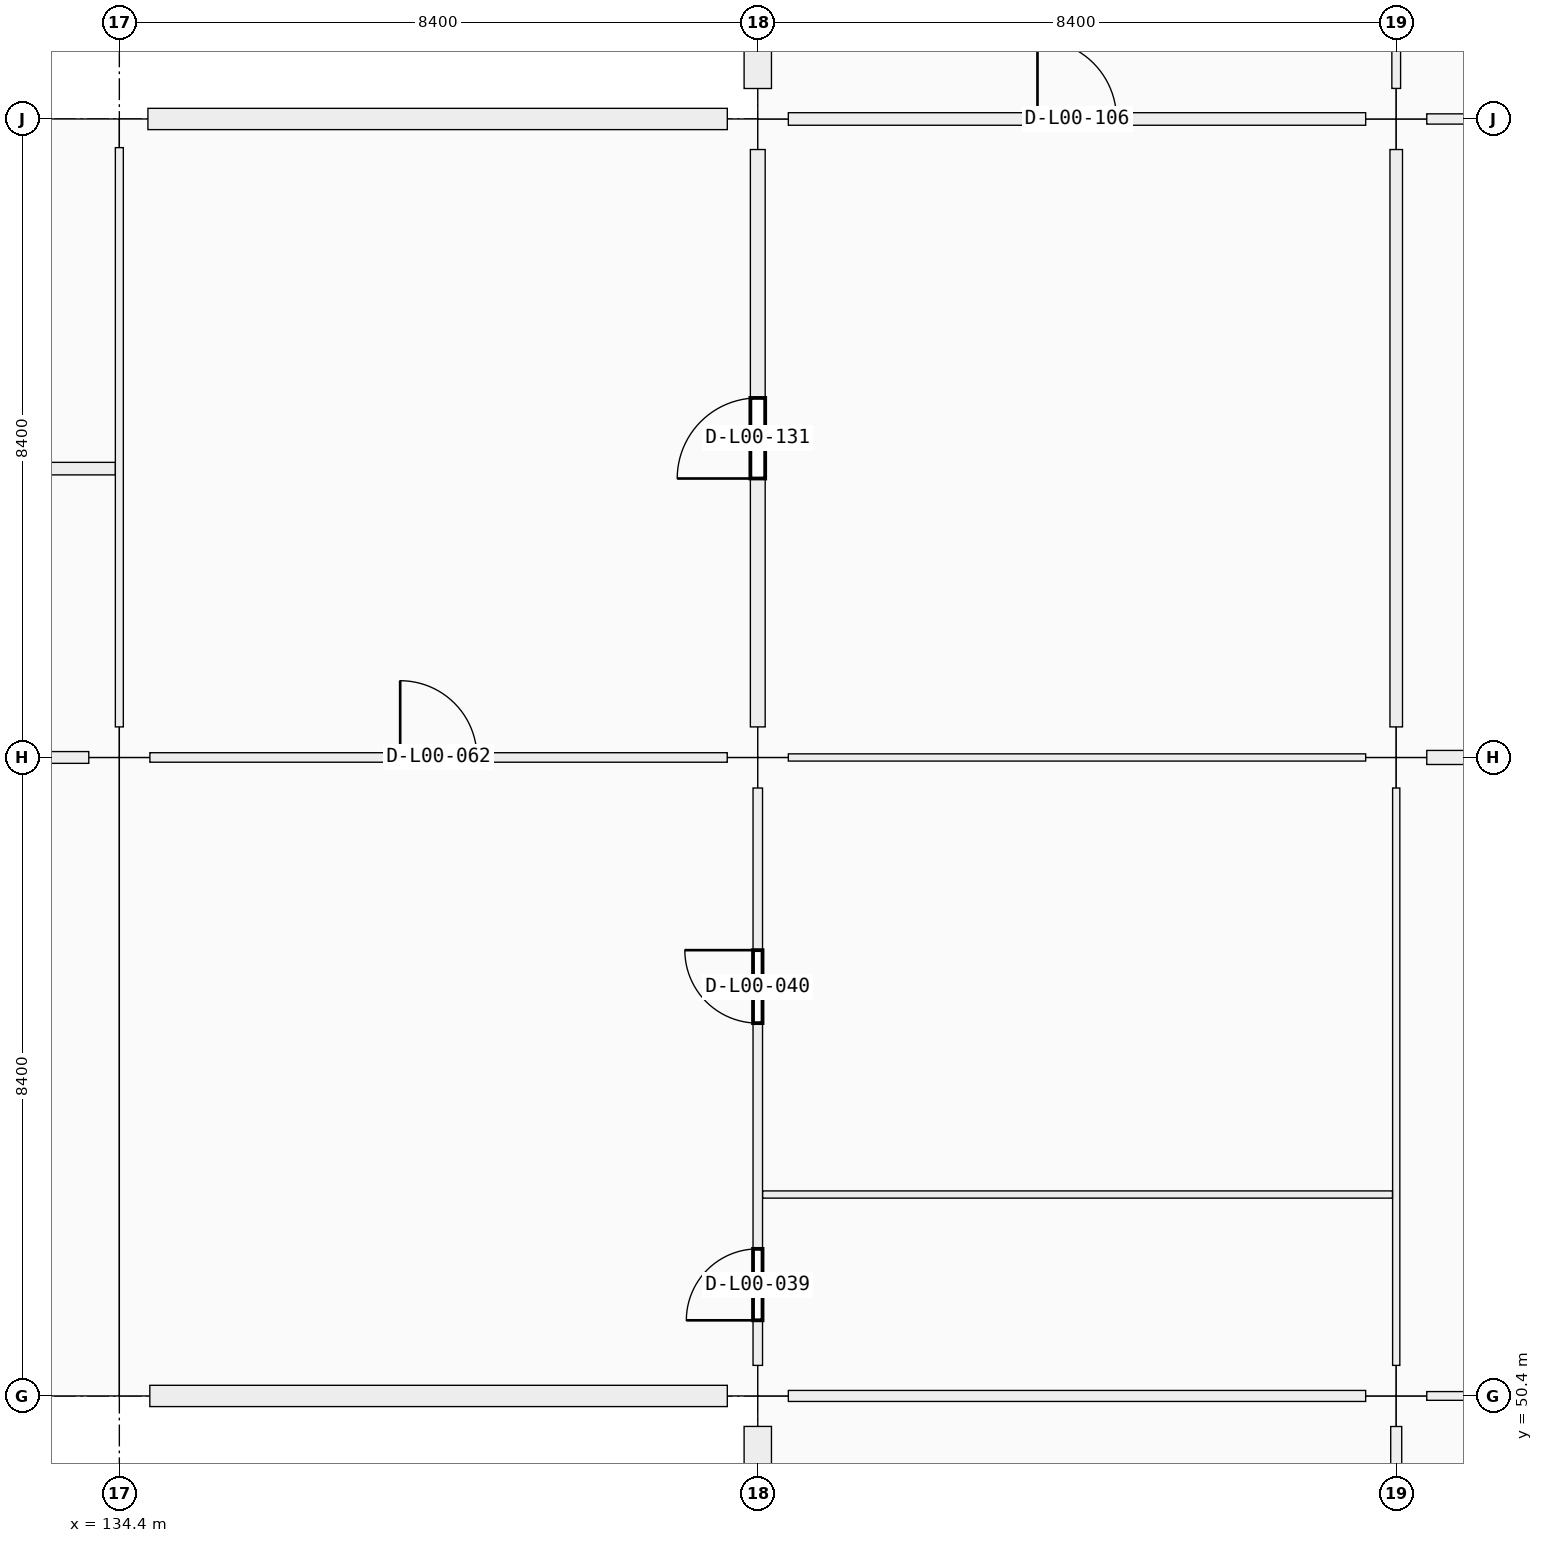
"""IFC4 building model, lengths in metres.
Left out: names, types, materials, properties, quantities, classifications, styles, units other than length and angle.
Written with IfcOpenShell. Run it as: python <this file> out.ifc"""

import sys

from ifc_helpers import new_model, si_unit, direction, frame, frame_2d, origin, origin_2d, place, context, subcontext, project, spatial, rectangle, extrude, element, fill, save


model = new_model("IFC4")
c1 = context("Model", 3, precision=1e-05, world=origin(), true_north=direction((0.0, 1.0)))
c2 = subcontext(c1, "Body", "Model", "MODEL_VIEW")
j1 = project(units=[si_unit("LENGTHUNIT", "METRE"), si_unit("PLANEANGLEUNIT", "RADIAN")], contexts=[c1])
p1 = place(None, origin())
s1 = spatial("IfcSite", under=j1, at=p1, CompositionType="ELEMENT")
p2 = place(p1, origin())
s2 = spatial("IfcBuilding", under=s1, at=p2, CompositionType="ELEMENT")
p3 = place(p2, origin())
s3 = spatial("IfcBuildingStorey", under=s2, at=p3, CompositionType="ELEMENT", Elevation=0.0)
for number, where, z_axis, x_axis in (
    (1, (134.4, 50.4, 0.0), (0.0, 0.0, 1.0), (1.0, 0.0, 0.0)),
    (2, (134.4, 58.8, 0.0), (0.0, 0.0, 1.0), (1.0, 0.0, 0.0)),
):
    element("IfcColumn", number, at=place(p3, frame(where, z_axis=z_axis, x_axis=x_axis)), inside=s3, PredefinedType="COLUMN", context=c2, shape_type="SweptSolid", body=[
        extrude(rectangle(XDim=0.8, YDim=0.8, at=origin_2d()), origin(), (0.0, 0.0, 1.0), 5.76),
    ])
p4 = place(p3, frame((134.4, 67.2, 0.0), z_axis=(0.0, 0.0, 1.0), x_axis=(1.0, 0.0, 0.0)))
e3 = element("IfcColumn", 3, at=p4, inside=s3, PredefinedType="COLUMN", context=c2, shape_type="SweptSolid", body=[
    extrude(rectangle(XDim=0.75, YDim=0.75, at=origin_2d()), origin(), (0.0, 0.0, 1.0), 5.76),
])
for number, where, z_axis, x_axis in (
    (4, (142.8, 50.4, 0.0), (0.0, 0.0, 1.0), (1.0, 0.0, 0.0)),
    (5, (142.8, 58.8, 0.0), (0.0, 0.0, 1.0), (1.0, 0.0, 0.0)),
    (6, (142.8, 67.2, 0.0), (0.0, 0.0, 1.0), (1.0, 0.0, 0.0)),
    (7, (151.2, 50.4, 0.0), (0.0, 0.0, 1.0), (1.0, 0.0, 0.0)),
    (8, (151.2, 58.8, 0.0), (0.0, 0.0, 1.0), (1.0, 0.0, 0.0)),
    (9, (151.2, 67.2, 0.0), (0.0, 0.0, 1.0), (1.0, 0.0, 0.0)),
):
    element("IfcColumn", number, at=place(p3, frame(where, z_axis=z_axis, x_axis=x_axis)), inside=s3, PredefinedType="COLUMN", context=c2, shape_type="SweptSolid", body=[
        extrude(rectangle(XDim=0.8, YDim=0.8, at=origin_2d()), origin(), (0.0, 0.0, 1.0), 5.76),
    ])
p5 = place(p3, frame((142.399, 50.4, 0.0), z_axis=(0.0, 0.0, 1.0), x_axis=(-1.0, 0.0, 0.0)))
e10 = element("IfcWall", 10, at=p5, inside=s3, PredefinedType="SOLIDWALL", context=c2, shape_type="SweptSolid", body=[
    extrude(rectangle(XDim=7.598, YDim=0.28, at=frame_2d((3.799, 0.0))), origin(), (0.0, 0.0, 1.0), 4.7),
])
p6 = place(p3, frame((134.776, 67.2, 0.0), z_axis=(0.0, 0.0, 1.0), x_axis=(1.0, 0.0, 0.0)))
e11 = element("IfcWall", 11, at=p6, inside=s3, PredefinedType="SOLIDWALL", context=c2, shape_type="SweptSolid", body=[
    extrude(rectangle(XDim=7.623, YDim=0.28, at=frame_2d((3.812, 0.0))), origin(), (0.0, 0.0, 1.0), 4.7),
])
p7 = place(p6, frame((2.537, 0.0, 0.9)))
e12 = element("IfcOpeningElement", 12, at=p7, cuts=e11, PredefinedType="OPENING", context=c2, shape_type="SweptSolid", body=[
    extrude(rectangle(XDim=2.55, YDim=1.95, at=frame_2d((1.275, 0.975))), frame((0.0, 0.14, 0.0), z_axis=(0.0, -1.0, 0.0), x_axis=(1.0, 0.0, 0.0)), (0.0, 0.0, 1.0), 0.28),
])
p8 = place(p3, frame((142.8, 42.401, 0.0), z_axis=(0.0, 0.0, 1.0), x_axis=(0.0, 1.0, 0.0)))
e13 = element("IfcWall", 13, at=p8, inside=s3, PredefinedType="SOLIDWALL", context=c2, shape_type="SweptSolid", body=[
    extrude(rectangle(XDim=7.598, YDim=0.36, at=frame_2d((3.799, 0.0))), origin(), (0.0, 0.0, 1.0), 4.7),
])
p9 = place(p8, frame((2.574, 0.0, 0.9)))
e14 = element("IfcOpeningElement", 14, at=p9, cuts=e13, PredefinedType="OPENING", context=c2, shape_type="SweptSolid", body=[
    extrude(rectangle(XDim=2.45, YDim=1.45, at=frame_2d((1.225, 0.725))), frame((0.0, 0.18, 0.0), z_axis=(0.0, -1.0, 0.0), x_axis=(1.0, 0.0, 0.0)), (0.0, 0.0, 1.0), 0.36),
])
p10 = place(p3, frame((142.8, 67.601, 0.0), z_axis=(0.0, 0.0, 1.0), x_axis=(0.0, 1.0, 0.0)))
e15 = element("IfcWall", 15, at=p10, inside=s3, PredefinedType="SOLIDWALL", context=c2, shape_type="SweptSolid", body=[
    extrude(rectangle(XDim=7.673, YDim=0.36, at=frame_2d((3.836, 0.0))), origin(), (0.0, 0.0, 1.0), 4.7),
])
p11 = place(p10, frame((2.937, 0.0, 0.9)))
e16 = element("IfcOpeningElement", 16, at=p11, cuts=e15, PredefinedType="OPENING", context=c2, shape_type="SweptSolid", body=[
    extrude(rectangle(XDim=1.8, YDim=1.8, at=frame_2d((0.9, 0.9))), frame((0.0, 0.18, 0.0), z_axis=(0.0, -1.0, 0.0), x_axis=(1.0, 0.0, 0.0)), (0.0, 0.0, 1.0), 0.36),
])
p12 = place(p3, frame((126.402, 58.8, 0.0), z_axis=(0.0, 0.0, 1.0), x_axis=(1.0, 0.0, 0.0)))
e17 = element("IfcWall", 17, at=p12, inside=s3, PredefinedType="PARTITIONING", context=c2, shape_type="SweptSolid", body=[
    extrude(rectangle(XDim=7.596, YDim=0.155, at=frame_2d((3.798, 0.0))), origin(), (0.0, 0.0, 1.0), 3.66),
])
p13 = place(p3, frame((134.802, 58.8, 0.0), z_axis=(0.0, 0.0, 1.0), x_axis=(1.0, 0.0, 0.0)))
e18 = element("IfcWall", 18, at=p13, inside=s3, PredefinedType="PARTITIONING", context=c2, shape_type="SweptSolid", body=[
    extrude(rectangle(XDim=7.596, YDim=0.125, at=frame_2d((3.798, 0.0))), origin(), (0.0, 0.0, 1.0), 3.66),
])
p14 = place(p13, frame((3.293, 0.0, 0.0)))
e19 = element("IfcOpeningElement", 19, at=p14, cuts=e18, PredefinedType="OPENING", context=c2, shape_type="SweptSolid", body=[
    extrude(rectangle(XDim=1.01, YDim=2.12, at=frame_2d((0.505, 1.06))), frame((0.0, 0.062, 0.0), z_axis=(0.0, -1.0, 0.0), x_axis=(1.0, 0.0, 0.0)), (0.0, 0.0, 1.0), 0.125),
])
p15 = place(p3, frame((143.202, 50.4, 0.0), z_axis=(0.0, 0.0, 1.0), x_axis=(1.0, 0.0, 0.0)))
e20 = element("IfcWall", 20, at=p15, inside=s3, PredefinedType="PARTITIONING", context=c2, shape_type="SweptSolid", body=[
    extrude(rectangle(XDim=7.596, YDim=0.145, at=frame_2d((3.798, 0.0))), origin(), (0.0, 0.0, 1.0), 3.66),
])
p16 = place(p3, frame((143.202, 58.8, 0.0), z_axis=(0.0, 0.0, 1.0), x_axis=(1.0, 0.0, 0.0)))
e21 = element("IfcWall", 21, at=p16, inside=s3, PredefinedType="PARTITIONING", context=c2, shape_type="SweptSolid", body=[
    extrude(rectangle(XDim=7.596, YDim=0.095, at=frame_2d((3.798, 0.0))), origin(), (0.0, 0.0, 1.0), 3.66),
])
p17 = place(p3, frame((143.202, 67.2, 0.0), z_axis=(0.0, 0.0, 1.0), x_axis=(1.0, 0.0, 0.0)))
e22 = element("IfcWall", 22, at=p17, inside=s3, PredefinedType="PARTITIONING", context=c2, shape_type="SweptSolid", body=[
    extrude(rectangle(XDim=7.596, YDim=0.165, at=frame_2d((3.798, 0.0))), origin(), (0.0, 0.0, 1.0), 3.66),
])
p18 = place(p17, frame((3.278, 0.0, 0.0)))
e23 = element("IfcOpeningElement", 23, at=p18, cuts=e22, PredefinedType="OPENING", context=c2, shape_type="SweptSolid", body=[
    extrude(rectangle(XDim=1.04, YDim=2.2, at=frame_2d((0.52, 1.1))), frame((0.0, 0.083, 0.0), z_axis=(0.0, -1.0, 0.0), x_axis=(1.0, 0.0, 0.0)), (0.0, 0.0, 1.0), 0.165),
])
p19 = place(p3, frame((151.602, 50.4, 0.0), z_axis=(0.0, 0.0, 1.0), x_axis=(1.0, 0.0, 0.0)))
e24 = element("IfcWall", 24, at=p19, inside=s3, PredefinedType="PARTITIONING", context=c2, shape_type="SweptSolid", body=[
    extrude(rectangle(XDim=7.596, YDim=0.115, at=frame_2d((3.798, 0.0))), origin(), (0.0, 0.0, 1.0), 3.66),
])
p20 = place(p19, frame((3.308, 0.0, 0.0)))
e25 = element("IfcOpeningElement", 25, at=p20, cuts=e24, PredefinedType="OPENING", context=c2, shape_type="SweptSolid", body=[
    extrude(rectangle(XDim=0.98, YDim=2.18, at=frame_2d((0.49, 1.09))), frame((0.0, 0.058, 0.0), z_axis=(0.0, -1.0, 0.0), x_axis=(1.0, 0.0, 0.0)), (0.0, 0.0, 1.0), 0.115),
])
p21 = place(p3, frame((151.602, 58.8, 0.0), z_axis=(0.0, 0.0, 1.0), x_axis=(1.0, 0.0, 0.0)))
e26 = element("IfcWall", 26, at=p21, inside=s3, PredefinedType="PARTITIONING", context=c2, shape_type="SweptSolid", body=[
    extrude(rectangle(XDim=7.596, YDim=0.185, at=frame_2d((3.798, 0.0))), origin(), (0.0, 0.0, 1.0), 3.66),
])
p22 = place(p21, frame((3.318, 0.0, 0.0)))
e27 = element("IfcOpeningElement", 27, at=p22, cuts=e26, PredefinedType="OPENING", context=c2, shape_type="SweptSolid", body=[
    extrude(rectangle(XDim=0.96, YDim=2.18, at=frame_2d((0.48, 1.09))), frame((0.0, 0.093, 0.0), z_axis=(0.0, -1.0, 0.0), x_axis=(1.0, 0.0, 0.0)), (0.0, 0.0, 1.0), 0.185),
])
p23 = place(p3, frame((151.602, 67.2, 0.0), z_axis=(0.0, 0.0, 1.0), x_axis=(1.0, 0.0, 0.0)))
e28 = element("IfcWall", 28, at=p23, inside=s3, PredefinedType="PARTITIONING", context=c2, shape_type="SweptSolid", body=[
    extrude(rectangle(XDim=7.596, YDim=0.135, at=frame_2d((3.798, 0.0))), origin(), (0.0, 0.0, 1.0), 3.66),
])
p24 = place(p23, frame((3.328, 0.0, 0.0)))
e29 = element("IfcOpeningElement", 29, at=p24, cuts=e28, PredefinedType="OPENING", context=c2, shape_type="SweptSolid", body=[
    extrude(rectangle(XDim=0.94, YDim=2.15, at=frame_2d((0.47, 1.075))), frame((0.0, 0.067, 0.0), z_axis=(0.0, -1.0, 0.0), x_axis=(1.0, 0.0, 0.0)), (0.0, 0.0, 1.0), 0.135),
])
p25 = place(p3, frame((134.4, 59.202, 0.0), z_axis=(0.0, 0.0, 1.0), x_axis=(0.0, 1.0, 0.0)))
e30 = element("IfcWall", 30, at=p25, inside=s3, PredefinedType="PARTITIONING", context=c2, shape_type="SweptSolid", body=[
    extrude(rectangle(XDim=7.621, YDim=0.105, at=frame_2d((3.811, 0.0))), origin(), (0.0, 0.0, 1.0), 3.66),
])
p26 = place(p3, frame((142.8, 50.802, 0.0), z_axis=(0.0, 0.0, 1.0), x_axis=(0.0, 1.0, 0.0)))
e31 = element("IfcWall", 31, at=p26, inside=s3, PredefinedType="PARTITIONING", context=c2, shape_type="SweptSolid", body=[
    extrude(rectangle(XDim=7.596, YDim=0.125, at=frame_2d((3.798, 0.0))), origin(), (0.0, 0.0, 1.0), 3.66),
])
p27 = place(p26, frame((0.593, 0.0, 0.0)))
e32 = element("IfcOpeningElement", 32, at=p27, cuts=e31, PredefinedType="OPENING", context=c2, shape_type="SweptSolid", body=[
    extrude(rectangle(XDim=0.94, YDim=2.08, at=frame_2d((0.47, 1.04))), frame((0.0, 0.062, 0.0), z_axis=(0.0, -1.0, 0.0), x_axis=(1.0, 0.0, 0.0)), (0.0, 0.0, 1.0), 0.125),
])
p28 = place(p26, frame((4.503, 0.0, 0.0)))
e33 = element("IfcOpeningElement", 33, at=p28, cuts=e31, PredefinedType="OPENING", context=c2, shape_type="SweptSolid", body=[
    extrude(rectangle(XDim=0.96, YDim=2.1, at=frame_2d((0.48, 1.05))), frame((0.0, 0.062, 0.0), z_axis=(0.0, -1.0, 0.0), x_axis=(1.0, 0.0, 0.0)), (0.0, 0.0, 1.0), 0.125),
])
p29 = place(p3, frame((142.8, 59.202, 0.0), z_axis=(0.0, 0.0, 1.0), x_axis=(0.0, 1.0, 0.0)))
e34 = element("IfcWall", 34, at=p29, inside=s3, PredefinedType="PARTITIONING", context=c2, shape_type="SweptSolid", body=[
    extrude(rectangle(XDim=7.596, YDim=0.195, at=frame_2d((3.798, 0.0))), origin(), (0.0, 0.0, 1.0), 3.66),
])
p30 = place(p29, frame((3.268, 0.0, 0.0)))
e35 = element("IfcOpeningElement", 35, at=p30, cuts=e34, PredefinedType="OPENING", context=c2, shape_type="SweptSolid", body=[
    extrude(rectangle(XDim=1.06, YDim=2.25, at=frame_2d((0.53, 1.125))), frame((0.0, 0.098, 0.0), z_axis=(0.0, -1.0, 0.0), x_axis=(1.0, 0.0, 0.0)), (0.0, 0.0, 1.0), 0.195),
])
p31 = place(p3, frame((151.2, 42.352, 0.0), z_axis=(0.0, 0.0, 1.0), x_axis=(0.0, 1.0, 0.0)))
e36 = element("IfcWall", 36, at=p31, inside=s3, PredefinedType="PARTITIONING", context=c2, shape_type="SweptSolid", body=[
    extrude(rectangle(XDim=7.646, YDim=0.145, at=frame_2d((3.823, 0.0))), origin(), (0.0, 0.0, 1.0), 3.66),
])
p32 = place(p31, frame((3.333, 0.0, 0.0)))
e37 = element("IfcOpeningElement", 37, at=p32, cuts=e36, PredefinedType="OPENING", context=c2, shape_type="SweptSolid", body=[
    extrude(rectangle(XDim=0.98, YDim=2.18, at=frame_2d((0.49, 1.09))), frame((0.0, 0.073, 0.0), z_axis=(0.0, -1.0, 0.0), x_axis=(1.0, 0.0, 0.0)), (0.0, 0.0, 1.0), 0.145),
])
p33 = place(p3, frame((151.2, 50.802, 0.0), z_axis=(0.0, 0.0, 1.0), x_axis=(0.0, 1.0, 0.0)))
e38 = element("IfcWall", 38, at=p33, inside=s3, PredefinedType="PARTITIONING", context=c2, shape_type="SweptSolid", body=[
    extrude(rectangle(XDim=7.596, YDim=0.095, at=frame_2d((3.798, 0.0))), origin(), (0.0, 0.0, 1.0), 3.66),
])
p34 = place(p3, frame((151.2, 59.202, 0.0), z_axis=(0.0, 0.0, 1.0), x_axis=(0.0, 1.0, 0.0)))
e39 = element("IfcWall", 39, at=p34, inside=s3, PredefinedType="PARTITIONING", context=c2, shape_type="SweptSolid", body=[
    extrude(rectangle(XDim=7.596, YDim=0.165, at=frame_2d((3.798, 0.0))), origin(), (0.0, 0.0, 1.0), 3.66),
])
p35 = place(p34, frame((3.318, 0.0, 0.0)))
e40 = element("IfcOpeningElement", 40, at=p35, cuts=e39, PredefinedType="OPENING", context=c2, shape_type="SweptSolid", body=[
    extrude(rectangle(XDim=0.96, YDim=2.18, at=frame_2d((0.48, 1.09))), frame((0.0, 0.083, 0.0), z_axis=(0.0, -1.0, 0.0), x_axis=(1.0, 0.0, 0.0)), (0.0, 0.0, 1.0), 0.165),
])
p36 = place(p3, frame((151.2, 67.602, 0.0), z_axis=(0.0, 0.0, 1.0), x_axis=(0.0, 1.0, 0.0)))
e41 = element("IfcWall", 41, at=p36, inside=s3, PredefinedType="PARTITIONING", context=c2, shape_type="SweptSolid", body=[
    extrude(rectangle(XDim=7.696, YDim=0.115, at=frame_2d((3.848, 0.0))), origin(), (0.0, 0.0, 1.0), 3.66),
])
p37 = place(p36, frame((3.378, 0.0, 0.0)))
e42 = element("IfcOpeningElement", 42, at=p37, cuts=e41, PredefinedType="OPENING", context=c2, shape_type="SweptSolid", body=[
    extrude(rectangle(XDim=0.94, YDim=2.15, at=frame_2d((0.47, 1.075))), frame((0.0, 0.058, 0.0), z_axis=(0.0, -1.0, 0.0), x_axis=(1.0, 0.0, 0.0)), (0.0, 0.0, 1.0), 0.115),
])
p38 = place(p3, frame((126.07, 62.6, 0.0), z_axis=(0.0, 0.0, 1.0), x_axis=(1.0, 0.0, 0.0)))
e43 = element("IfcWall", 43, at=p38, inside=s3, PredefinedType="PARTITIONING", context=c2, shape_type="SweptSolid", body=[
    extrude(rectangle(XDim=8.276, YDim=0.165, at=frame_2d((4.138, 0.0))), origin(), (0.0, 0.0, 1.0), 3.66),
])
p39 = place(p3, frame((142.865, 53.05, 0.0), z_axis=(0.0, 0.0, 1.0), x_axis=(1.0, 0.0, 0.0)))
e44 = element("IfcWall", 44, at=p39, inside=s3, PredefinedType="PARTITIONING", context=c2, shape_type="SweptSolid", body=[
    extrude(rectangle(XDim=8.286, YDim=0.095, at=frame_2d((4.143, 0.0))), origin(), (0.0, 0.0, 1.0), 3.66),
])
p40 = place(p7, origin())
e45 = element("IfcWindow", 45, at=p40, inside=s3, PartitioningType="SINGLE_PANEL", PredefinedType="WINDOW", context=c2, shape_type="SweptSolid", body=[
    extrude(rectangle(XDim=2.55, YDim=1.95, at=frame_2d((1.275, 0.975))), frame((0.0, 0.03, 0.0), z_axis=(0.0, -1.0, 0.0), x_axis=(1.0, 0.0, 0.0)), (0.0, 0.0, 1.0), 0.06),
])
fill(e12, e45)
p41 = place(p27, origin())
e46 = element("IfcDoor", 46, at=p41, inside=s3, OperationType="SINGLE_SWING_LEFT", PredefinedType="DOOR", context=c2, shape_type="SweptSolid", body=[
    extrude(rectangle(XDim=0.94, YDim=2.08, at=frame_2d((0.47, 1.04))), frame((0.0, 0.025, 0.0), z_axis=(0.0, -1.0, 0.0), x_axis=(1.0, 0.0, 0.0)), (0.0, 0.0, 1.0), 0.05),
])
fill(e32, e46)
p42 = place(p28, origin())
e47 = element("IfcDoor", 47, at=p42, inside=s3, OperationType="SINGLE_SWING_RIGHT", PredefinedType="DOOR", context=c2, shape_type="SweptSolid", body=[
    extrude(rectangle(XDim=0.96, YDim=2.1, at=frame_2d((0.48, 1.05))), frame((0.0, 0.025, 0.0), z_axis=(0.0, -1.0, 0.0), x_axis=(1.0, 0.0, 0.0)), (0.0, 0.0, 1.0), 0.05),
])
fill(e33, e47)
p43 = place(p14, origin())
e48 = element("IfcDoor", 48, at=p43, inside=s3, OperationType="SINGLE_SWING_LEFT", PredefinedType="DOOR", context=c2, shape_type="SweptSolid", body=[
    extrude(rectangle(XDim=1.01, YDim=2.12, at=frame_2d((0.505, 1.06))), frame((0.0, 0.025, 0.0), z_axis=(0.0, -1.0, 0.0), x_axis=(1.0, 0.0, 0.0)), (0.0, 0.0, 1.0), 0.05),
])
fill(e19, e48)
p44 = place(p18, origin())
e49 = element("IfcDoor", 49, at=p44, inside=s3, OperationType="SINGLE_SWING_LEFT", PredefinedType="DOOR", context=c2, shape_type="SweptSolid", body=[
    extrude(rectangle(XDim=1.04, YDim=2.2, at=frame_2d((0.52, 1.1))), frame((0.0, 0.025, 0.0), z_axis=(0.0, -1.0, 0.0), x_axis=(1.0, 0.0, 0.0)), (0.0, 0.0, 1.0), 0.05),
])
fill(e23, e49)
p45 = place(p30, origin())
e50 = element("IfcDoor", 50, at=p45, inside=s3, OperationType="SINGLE_SWING_LEFT", PredefinedType="DOOR", context=c2, shape_type="SweptSolid", body=[
    extrude(rectangle(XDim=1.06, YDim=2.25, at=frame_2d((0.53, 1.125))), frame((0.0, 0.025, 0.0), z_axis=(0.0, -1.0, 0.0), x_axis=(1.0, 0.0, 0.0)), (0.0, 0.0, 1.0), 0.05),
])
fill(e35, e50)
p46 = place(p35, origin())
e51 = element("IfcDoor", 51, at=p46, inside=s3, OperationType="SINGLE_SWING_RIGHT", PredefinedType="DOOR", context=c2, shape_type="SweptSolid", body=[
    extrude(rectangle(XDim=0.96, YDim=2.18, at=frame_2d((0.48, 1.09))), frame((0.0, 0.025, 0.0), z_axis=(0.0, -1.0, 0.0), x_axis=(1.0, 0.0, 0.0)), (0.0, 0.0, 1.0), 0.05),
])
fill(e40, e51)
save(model, sys.argv[1])
